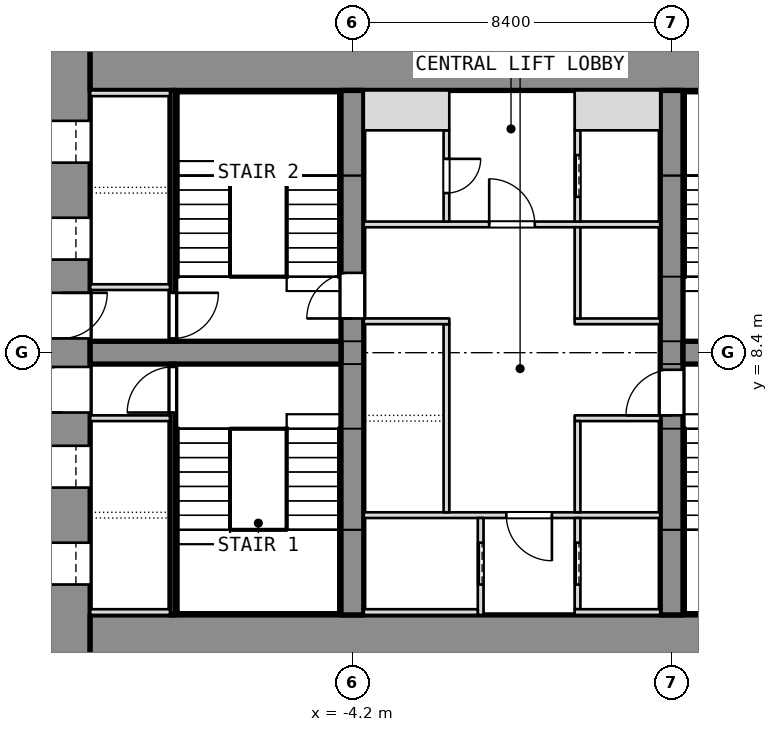
"""IFC4 building model, lengths in metres.
Left out: names, types, materials, properties, quantities, classifications, styles, units other than length and angle.
Written with IfcOpenShell. Run it as: python <this file> out.ifc"""

import sys

from ifc_helpers import new_model, si_unit, direction, frame, frame_2d, origin, place, context, subcontext, project, spatial, rectangle, extrude, element, fill, save


model = new_model("IFC4")
c1 = context("Model", 3, precision=1e-05, world=origin(), true_north=direction((0.0, 1.0)))
c2 = subcontext(c1, "Body", "Model", "MODEL_VIEW")
j1 = project(units=[si_unit("LENGTHUNIT", "METRE"), si_unit("PLANEANGLEUNIT", "RADIAN")], contexts=[c1])
p1 = place(None, origin())
s1 = spatial("IfcSite", under=j1, at=p1, CompositionType="ELEMENT")
p2 = place(p1, origin())
s2 = spatial("IfcBuilding", under=s1, at=p2, CompositionType="ELEMENT")
p3 = place(p2, frame((0.0, 0.0, 21.0)))
s3 = spatial("IfcBuildingStorey", under=s2, at=p3, CompositionType="ELEMENT", Elevation=21.0)
p4 = place(p3, frame((-11.85, 0.0, 0.0), z_axis=(0.0, 0.0, 1.0), x_axis=(0.0, 1.0, 0.0)))
e1 = element("IfcWall", 1, at=p4, inside=s3, PredefinedType="SHEAR", context=c2, shape_type="SweptSolid", body=[
    extrude(rectangle(XDim=16.8, YDim=1.5, at=frame_2d((8.4, 0.0))), origin(), (0.0, 0.0, 1.0), 5.0),
])
p5 = place(p4, frame((2.3, 0.0, 0.0)))
e2 = element("IfcOpeningElement", 2, at=p5, cuts=e1, PredefinedType="OPENING", context=c2, shape_type="SweptSolid", body=[
    extrude(rectangle(XDim=1.1, YDim=2.1, at=frame_2d((0.55, 1.05))), frame((0.0, 0.75, 0.0), z_axis=(0.0, -1.0, 0.0), x_axis=(1.0, 0.0, 0.0)), (0.0, 0.0, 1.0), 1.5),
])
p6 = place(p4, frame((4.85, 0.0, 0.0)))
e3 = element("IfcOpeningElement", 3, at=p6, cuts=e1, PredefinedType="OPENING", context=c2, shape_type="SweptSolid", body=[
    extrude(rectangle(XDim=1.1, YDim=2.1, at=frame_2d((0.55, 1.05))), frame((0.0, 0.75, 0.0), z_axis=(0.0, -1.0, 0.0), x_axis=(1.0, 0.0, 0.0)), (0.0, 0.0, 1.0), 1.5),
])
p7 = place(p4, frame((6.825, 0.0, 0.0)))
e4 = element("IfcOpeningElement", 4, at=p7, cuts=e1, PredefinedType="OPENING", context=c2, shape_type="SweptSolid", body=[
    extrude(rectangle(XDim=1.2, YDim=2.1, at=frame_2d((0.6, 1.05))), frame((0.0, 0.75, 0.0), z_axis=(0.0, -1.0, 0.0), x_axis=(1.0, 0.0, 0.0)), (0.0, 0.0, 1.0), 1.5),
])
p8 = place(p4, frame((13.4, 0.0, 0.0)))
e5 = element("IfcOpeningElement", 5, at=p8, cuts=e1, PredefinedType="OPENING", context=c2, shape_type="SweptSolid", body=[
    extrude(rectangle(XDim=1.1, YDim=2.1, at=frame_2d((0.55, 1.05))), frame((0.0, 0.75, 0.0), z_axis=(0.0, -1.0, 0.0), x_axis=(1.0, 0.0, 0.0)), (0.0, 0.0, 1.0), 1.5),
])
p9 = place(p4, frame((10.85, 0.0, 0.0)))
e6 = element("IfcOpeningElement", 6, at=p9, cuts=e1, PredefinedType="OPENING", context=c2, shape_type="SweptSolid", body=[
    extrude(rectangle(XDim=1.1, YDim=2.1, at=frame_2d((0.55, 1.05))), frame((0.0, 0.75, 0.0), z_axis=(0.0, -1.0, 0.0), x_axis=(1.0, 0.0, 0.0)), (0.0, 0.0, 1.0), 1.5),
])
p10 = place(p4, frame((8.775, 0.0, 0.0)))
e7 = element("IfcOpeningElement", 7, at=p10, cuts=e1, PredefinedType="OPENING", context=c2, shape_type="SweptSolid", body=[
    extrude(rectangle(XDim=1.2, YDim=2.1, at=frame_2d((0.6, 1.05))), frame((0.0, 0.75, 0.0), z_axis=(0.0, -1.0, 0.0), x_axis=(1.0, 0.0, 0.0)), (0.0, 0.0, 1.0), 1.5),
])
for number, where, z_axis, x_axis in (
    (8, (-11.1, 0.75, 0.0), (0.0, 0.0, 1.0), (1.0, 0.0, 0.0)),
    (9, (-11.1, 16.05, 0.0), (0.0, 0.0, 1.0), (1.0, 0.0, 0.0)),
):
    element("IfcWall", number, at=place(p3, frame(where, z_axis=z_axis, x_axis=x_axis)), inside=s3, PredefinedType="SHEAR", context=c2, shape_type="SweptSolid", body=[
        extrude(rectangle(XDim=22.2, YDim=1.5, at=frame_2d((11.1, 0.0))), origin(), (0.0, 0.0, 1.0), 5.0),
    ])
p11 = place(p3, frame((-4.2, 1.5, 0.0), z_axis=(0.0, 0.0, 1.0), x_axis=(0.0, 1.0, 0.0)))
e10 = element("IfcWall", 10, at=p11, inside=s3, PredefinedType="SHEAR", context=c2, shape_type="SweptSolid", body=[
    extrude(rectangle(XDim=13.8, YDim=0.6, at=frame_2d((6.9, 0.0))), origin(), (0.0, 0.0, 1.0), 5.0),
])
p12 = place(p11, frame((7.8, 0.0, 0.0)))
e11 = element("IfcOpeningElement", 11, at=p12, cuts=e10, PredefinedType="OPENING", context=c2, shape_type="SweptSolid", body=[
    extrude(rectangle(XDim=1.2, YDim=2.1, at=frame_2d((0.6, 1.05))), frame((0.0, 0.3, 0.0), z_axis=(0.0, -1.0, 0.0), x_axis=(1.0, 0.0, 0.0)), (0.0, 0.0, 1.0), 0.6),
])
p13 = place(p3, frame((4.2, 1.5, 0.0), z_axis=(0.0, 0.0, 1.0), x_axis=(0.0, 1.0, 0.0)))
e12 = element("IfcWall", 12, at=p13, inside=s3, PredefinedType="SHEAR", context=c2, shape_type="SweptSolid", body=[
    extrude(rectangle(XDim=13.8, YDim=0.6, at=frame_2d((6.9, 0.0))), origin(), (0.0, 0.0, 1.0), 5.0),
])
p14 = place(p13, frame((5.25, 0.0, 0.0)))
e13 = element("IfcOpeningElement", 13, at=p14, cuts=e12, PredefinedType="OPENING", context=c2, shape_type="SweptSolid", body=[
    extrude(rectangle(XDim=1.2, YDim=2.1, at=frame_2d((0.6, 1.05))), frame((0.0, 0.3, 0.0), z_axis=(0.0, -1.0, 0.0), x_axis=(1.0, 0.0, 0.0)), (0.0, 0.0, 1.0), 0.6),
])
for number, where, z_axis, x_axis in (
    (14, (-11.1, 8.4, 0.0), (0.0, 0.0, 1.0), (1.0, 0.0, 0.0)),
    (15, (4.5, 8.4, 0.0), (0.0, 0.0, 1.0), (1.0, 0.0, 0.0)),
):
    element("IfcWall", number, at=place(p3, frame(where, z_axis=z_axis, x_axis=x_axis)), inside=s3, PredefinedType="SHEAR", context=c2, shape_type="SweptSolid", body=[
        extrude(rectangle(XDim=6.6, YDim=0.6, at=frame_2d((3.3, 0.0))), origin(), (0.0, 0.0, 1.0), 5.0),
    ])
p15 = place(p3, frame((-8.925, 1.5, 0.0), z_axis=(0.0, 0.0, 1.0), x_axis=(0.0, 1.0, 0.0)))
e16 = element("IfcWall", 16, at=p15, inside=s3, PredefinedType="SHEAR", context=c2, shape_type="SweptSolid", body=[
    extrude(rectangle(XDim=6.6, YDim=0.15, at=frame_2d((3.3, 0.0))), origin(), (0.0, 0.0, 1.0), 4.78),
])
p16 = place(p15, frame((5.325, 0.0, 0.0)))
e17 = element("IfcOpeningElement", 17, at=p16, cuts=e16, PredefinedType="OPENING", context=c2, shape_type="SweptSolid", body=[
    extrude(rectangle(XDim=1.2, YDim=2.1, at=frame_2d((0.6, 1.05))), frame((0.0, 0.075, 0.0), z_axis=(0.0, -1.0, 0.0), x_axis=(1.0, 0.0, 0.0)), (0.0, 0.0, 1.0), 0.15),
])
for number, where, z_axis, x_axis in (
    (18, (-11.1, 6.675, 0.0), (0.0, 0.0, 1.0), (1.0, 0.0, 0.0)),
    (19, (-11.1, 1.575, 0.0), (0.0, 0.0, 1.0), (1.0, 0.0, 0.0)),
):
    element("IfcWall", number, at=place(p3, frame(where, z_axis=z_axis, x_axis=x_axis)), inside=s3, PredefinedType="SHEAR", context=c2, shape_type="SweptSolid", body=[
        extrude(rectangle(XDim=2.1, YDim=0.15, at=frame_2d((1.05, 0.0))), origin(), (0.0, 0.0, 1.0), 5.0),
    ])
p17 = place(p3, frame((-8.925, 8.7, 0.0), z_axis=(0.0, 0.0, 1.0), x_axis=(0.0, 1.0, 0.0)))
e20 = element("IfcWall", 20, at=p17, inside=s3, PredefinedType="SHEAR", context=c2, shape_type="SweptSolid", body=[
    extrude(rectangle(XDim=6.6, YDim=0.15, at=frame_2d((3.3, 0.0))), origin(), (0.0, 0.0, 1.0), 4.78),
])
p18 = place(p17, frame((0.075, 0.0, 0.0)))
e21 = element("IfcOpeningElement", 21, at=p18, cuts=e20, PredefinedType="OPENING", context=c2, shape_type="SweptSolid", body=[
    extrude(rectangle(XDim=1.2, YDim=2.1, at=frame_2d((0.6, 1.05))), frame((0.0, 0.075, 0.0), z_axis=(0.0, -1.0, 0.0), x_axis=(1.0, 0.0, 0.0)), (0.0, 0.0, 1.0), 0.15),
])
for number, where, z_axis, x_axis in (
    (22, (-11.1, 10.125, 0.0), (0.0, 0.0, 1.0), (1.0, 0.0, 0.0)),
    (23, (-11.1, 15.225, 0.0), (0.0, 0.0, 1.0), (1.0, 0.0, 0.0)),
):
    element("IfcWall", number, at=place(p3, frame(where, z_axis=z_axis, x_axis=x_axis)), inside=s3, PredefinedType="SHEAR", context=c2, shape_type="SweptSolid", body=[
        extrude(rectangle(XDim=2.1, YDim=0.15, at=frame_2d((1.05, 0.0))), origin(), (0.0, 0.0, 1.0), 5.0),
    ])
p19 = place(p3, frame((-3.9, 4.125, 0.0), z_axis=(0.0, 0.0, 1.0), x_axis=(1.0, 0.0, 0.0)))
e24 = element("IfcWall", 24, at=p19, inside=s3, PredefinedType="PARTITIONING", context=c2, shape_type="SweptSolid", body=[
    extrude(rectangle(XDim=7.8, YDim=0.15, at=frame_2d((3.9, 0.0))), origin(), (0.0, 0.0, 1.0), 4.78),
])
p20 = place(p19, frame((3.75, 0.0, 0.0)))
e25 = element("IfcOpeningElement", 25, at=p20, cuts=e24, PredefinedType="OPENING", context=c2, shape_type="SweptSolid", body=[
    extrude(rectangle(XDim=1.2, YDim=2.1, at=frame_2d((0.6, 1.05))), frame((0.0, 0.075, 0.0), z_axis=(0.0, -1.0, 0.0), x_axis=(1.0, 0.0, 0.0)), (0.0, 0.0, 1.0), 0.15),
])
p21 = place(p3, frame((-3.9, 11.775, 0.0), z_axis=(0.0, 0.0, 1.0), x_axis=(1.0, 0.0, 0.0)))
e26 = element("IfcWall", 26, at=p21, inside=s3, PredefinedType="PARTITIONING", context=c2, shape_type="SweptSolid", body=[
    extrude(rectangle(XDim=7.8, YDim=0.15, at=frame_2d((3.9, 0.0))), origin(), (0.0, 0.0, 1.0), 4.78),
])
p22 = place(p21, frame((3.3, 0.0, 0.0)))
e27 = element("IfcOpeningElement", 27, at=p22, cuts=e26, PredefinedType="OPENING", context=c2, shape_type="SweptSolid", body=[
    extrude(rectangle(XDim=1.2, YDim=2.1, at=frame_2d((0.6, 1.05))), frame((0.0, 0.075, 0.0), z_axis=(0.0, -1.0, 0.0), x_axis=(1.0, 0.0, 0.0)), (0.0, 0.0, 1.0), 0.15),
])
p23 = place(p3, frame((-0.825, 1.5, 0.0), z_axis=(0.0, 0.0, 1.0), x_axis=(0.0, 1.0, 0.0)))
e28 = element("IfcWall", 28, at=p23, inside=s3, PredefinedType="SHEAR", context=c2, shape_type="SweptSolid", body=[
    extrude(rectangle(XDim=2.55, YDim=0.15, at=frame_2d((1.275, 0.0))), origin(), (0.0, 0.0, 1.0), 5.0),
])
p24 = place(p23, frame((0.8, 0.0, 0.0)))
e29 = element("IfcOpeningElement", 29, at=p24, cuts=e28, PredefinedType="OPENING", context=c2, shape_type="SweptSolid", body=[
    extrude(rectangle(XDim=1.1, YDim=2.1, at=frame_2d((0.55, 1.05))), frame((0.0, 0.075, 0.0), z_axis=(0.0, -1.0, 0.0), x_axis=(1.0, 0.0, 0.0)), (0.0, 0.0, 1.0), 0.15),
])
p25 = place(p3, frame((-3.9, 1.575, 0.0), z_axis=(0.0, 0.0, 1.0), x_axis=(1.0, 0.0, 0.0)))
e30 = element("IfcWall", 30, at=p25, inside=s3, PredefinedType="SHEAR", context=c2, shape_type="SweptSolid", body=[
    extrude(rectangle(XDim=3.0, YDim=0.15, at=frame_2d((1.5, 0.0))), origin(), (0.0, 0.0, 1.0), 5.0),
])
p26 = place(p3, frame((-1.725, 4.2, 0.0), z_axis=(0.0, 0.0, 1.0), x_axis=(0.0, 1.0, 0.0)))
e31 = element("IfcWall", 31, at=p26, inside=s3, PredefinedType="SHEAR", context=c2, shape_type="SweptSolid", body=[
    extrude(rectangle(XDim=4.95, YDim=0.15, at=frame_2d((2.475, 0.0))), origin(), (0.0, 0.0, 1.0), 5.0),
])
p27 = place(p3, frame((-3.9, 9.225, 0.0), z_axis=(0.0, 0.0, 1.0), x_axis=(1.0, 0.0, 0.0)))
e32 = element("IfcWall", 32, at=p27, inside=s3, PredefinedType="SHEAR", context=c2, shape_type="SweptSolid", body=[
    extrude(rectangle(XDim=2.25, YDim=0.15, at=frame_2d((1.125, 0.0))), origin(), (0.0, 0.0, 1.0), 5.0),
])
p28 = place(p3, frame((-1.725, 11.85, 0.0), z_axis=(0.0, 0.0, 1.0), x_axis=(0.0, 1.0, 0.0)))
e33 = element("IfcWall", 33, at=p28, inside=s3, PredefinedType="PARTITIONING", context=c2, shape_type="SweptSolid", body=[
    extrude(rectangle(XDim=2.4, YDim=0.15, at=frame_2d((1.2, 0.0))), origin(), (0.0, 0.0, 1.0), 4.78),
])
p29 = place(p28, frame((0.75, 0.0, 0.0)))
e34 = element("IfcOpeningElement", 34, at=p29, cuts=e33, PredefinedType="OPENING", context=c2, shape_type="SweptSolid", body=[
    extrude(rectangle(XDim=0.9, YDim=2.1, at=frame_2d((0.45, 1.05))), frame((0.0, 0.075, 0.0), z_axis=(0.0, -1.0, 0.0), x_axis=(1.0, 0.0, 0.0)), (0.0, 0.0, 1.0), 0.15),
])
p30 = place(p3, frame((-3.9, 14.775, 0.0), z_axis=(0.0, 0.0, 1.0), x_axis=(1.0, 0.0, 0.0)))
e35 = element("IfcWall", 35, at=p30, inside=s3, PredefinedType="PARTITIONING", context=c2, shape_type="SweptSolid", body=[
    extrude(rectangle(XDim=2.25, YDim=1.05, at=frame_2d((1.125, 0.0))), origin(), (0.0, 0.0, 1.0), 4.78),
])
p31 = place(p3, frame((1.725, 1.65, 0.0), z_axis=(0.0, 0.0, 1.0), x_axis=(0.0, 1.0, 0.0)))
e36 = element("IfcWall", 36, at=p31, inside=s3, PredefinedType="SHEAR", context=c2, shape_type="SweptSolid", body=[
    extrude(rectangle(XDim=2.4, YDim=0.15, at=frame_2d((1.2, 0.0))), origin(), (0.0, 0.0, 1.0), 5.0),
])
p32 = place(p31, frame((0.65, 0.0, 0.0)))
e37 = element("IfcOpeningElement", 37, at=p32, cuts=e36, PredefinedType="OPENING", context=c2, shape_type="SweptSolid", body=[
    extrude(rectangle(XDim=1.1, YDim=2.1, at=frame_2d((0.55, 1.05))), frame((0.0, 0.075, 0.0), z_axis=(0.0, -1.0, 0.0), x_axis=(1.0, 0.0, 0.0)), (0.0, 0.0, 1.0), 0.15),
])
p33 = place(p3, frame((1.65, 1.575, 0.0), z_axis=(0.0, 0.0, 1.0), x_axis=(1.0, 0.0, 0.0)))
e38 = element("IfcWall", 38, at=p33, inside=s3, PredefinedType="SHEAR", context=c2, shape_type="SweptSolid", body=[
    extrude(rectangle(XDim=2.25, YDim=0.15, at=frame_2d((1.125, 0.0))), origin(), (0.0, 0.0, 1.0), 5.0),
])
p34 = place(p3, frame((1.725, 11.85, 0.0), z_axis=(0.0, 0.0, 1.0), x_axis=(0.0, 1.0, 0.0)))
e39 = element("IfcWall", 39, at=p34, inside=s3, PredefinedType="SHEAR", context=c2, shape_type="SweptSolid", body=[
    extrude(rectangle(XDim=2.4, YDim=0.15, at=frame_2d((1.2, 0.0))), origin(), (0.0, 0.0, 1.0), 5.0),
])
p35 = place(p34, frame((0.65, 0.0, 0.0)))
e40 = element("IfcOpeningElement", 40, at=p35, cuts=e39, PredefinedType="OPENING", context=c2, shape_type="SweptSolid", body=[
    extrude(rectangle(XDim=1.1, YDim=2.1, at=frame_2d((0.55, 1.05))), frame((0.0, 0.075, 0.0), z_axis=(0.0, -1.0, 0.0), x_axis=(1.0, 0.0, 0.0)), (0.0, 0.0, 1.0), 0.15),
])
p36 = place(p3, frame((1.65, 14.775, 0.0), z_axis=(0.0, 0.0, 1.0), x_axis=(1.0, 0.0, 0.0)))
e41 = element("IfcWall", 41, at=p36, inside=s3, PredefinedType="SHEAR", context=c2, shape_type="SweptSolid", body=[
    extrude(rectangle(XDim=2.25, YDim=1.05, at=frame_2d((1.125, 0.0))), origin(), (0.0, 0.0, 1.0), 5.0),
])
for number, where, z_axis, x_axis in (
    (42, (1.65, 6.675, 0.0), (0.0, 0.0, 1.0), (1.0, 0.0, 0.0)),
    (43, (1.65, 9.225, 0.0), (0.0, 0.0, 1.0), (1.0, 0.0, 0.0)),
):
    element("IfcWall", number, at=place(p3, frame(where, z_axis=z_axis, x_axis=x_axis)), inside=s3, PredefinedType="SHEAR", context=c2, shape_type="SweptSolid", body=[
        extrude(rectangle(XDim=2.25, YDim=0.15, at=frame_2d((1.125, 0.0))), origin(), (0.0, 0.0, 1.0), 5.0),
    ])
p37 = place(p3, frame((1.725, 4.2, 0.0), z_axis=(0.0, 0.0, 1.0), x_axis=(0.0, 1.0, 0.0)))
e44 = element("IfcWall", 44, at=p37, inside=s3, PredefinedType="SHEAR", context=c2, shape_type="SweptSolid", body=[
    extrude(rectangle(XDim=2.4, YDim=0.15, at=frame_2d((1.2, 0.0))), origin(), (0.0, 0.0, 1.0), 5.0),
])
p38 = place(p3, frame((1.725, 9.3, 0.0), z_axis=(0.0, 0.0, 1.0), x_axis=(0.0, 1.0, 0.0)))
e45 = element("IfcWall", 45, at=p38, inside=s3, PredefinedType="SHEAR", context=c2, shape_type="SweptSolid", body=[
    extrude(rectangle(XDim=2.4, YDim=0.15, at=frame_2d((1.2, 0.0))), origin(), (0.0, 0.0, 1.0), 5.0),
])
p39 = place(p5, origin())
e46 = element("IfcDoor", 46, at=p39, inside=s3, OperationType="SLIDING_TO_LEFT", PredefinedType="DOOR", context=c2, shape_type="SweptSolid", body=[
    extrude(rectangle(XDim=1.1, YDim=2.1, at=frame_2d((0.55, 1.05))), frame((0.0, 0.025, 0.0), z_axis=(0.0, -1.0, 0.0), x_axis=(1.0, 0.0, 0.0)), (0.0, 0.0, 1.0), 0.05),
])
fill(e2, e46)
p40 = place(p6, origin())
e47 = element("IfcDoor", 47, at=p40, inside=s3, OperationType="SLIDING_TO_LEFT", PredefinedType="DOOR", context=c2, shape_type="SweptSolid", body=[
    extrude(rectangle(XDim=1.1, YDim=2.1, at=frame_2d((0.55, 1.05))), frame((0.0, 0.025, 0.0), z_axis=(0.0, -1.0, 0.0), x_axis=(1.0, 0.0, 0.0)), (0.0, 0.0, 1.0), 0.05),
])
fill(e3, e47)
p41 = place(p7, origin())
e48 = element("IfcDoor", 48, at=p41, inside=s3, OperationType="SINGLE_SWING_LEFT", PredefinedType="DOOR", context=c2, shape_type="SweptSolid", body=[
    extrude(rectangle(XDim=1.2, YDim=2.1, at=frame_2d((0.6, 1.05))), frame((0.0, 0.025, 0.0), z_axis=(0.0, -1.0, 0.0), x_axis=(1.0, 0.0, 0.0)), (0.0, 0.0, 1.0), 0.05),
])
fill(e4, e48)
p42 = place(p16, origin())
e49 = element("IfcDoor", 49, at=p42, inside=s3, OperationType="SINGLE_SWING_LEFT", PredefinedType="DOOR", context=c2, shape_type="SweptSolid", body=[
    extrude(rectangle(XDim=1.2, YDim=2.1, at=frame_2d((0.6, 1.05))), frame((0.0, 0.025, 0.0), z_axis=(0.0, -1.0, 0.0), x_axis=(1.0, 0.0, 0.0)), (0.0, 0.0, 1.0), 0.05),
])
fill(e17, e49)
p43 = place(p8, origin())
e50 = element("IfcDoor", 50, at=p43, inside=s3, OperationType="SLIDING_TO_LEFT", PredefinedType="DOOR", context=c2, shape_type="SweptSolid", body=[
    extrude(rectangle(XDim=1.1, YDim=2.1, at=frame_2d((0.55, 1.05))), frame((0.0, 0.025, 0.0), z_axis=(0.0, -1.0, 0.0), x_axis=(1.0, 0.0, 0.0)), (0.0, 0.0, 1.0), 0.05),
])
fill(e5, e50)
p44 = place(p9, origin())
e51 = element("IfcDoor", 51, at=p44, inside=s3, OperationType="SLIDING_TO_LEFT", PredefinedType="DOOR", context=c2, shape_type="SweptSolid", body=[
    extrude(rectangle(XDim=1.1, YDim=2.1, at=frame_2d((0.55, 1.05))), frame((0.0, 0.025, 0.0), z_axis=(0.0, -1.0, 0.0), x_axis=(1.0, 0.0, 0.0)), (0.0, 0.0, 1.0), 0.05),
])
fill(e6, e51)
p45 = place(p10, origin())
e52 = element("IfcDoor", 52, at=p45, inside=s3, OperationType="SINGLE_SWING_LEFT", PredefinedType="DOOR", context=c2, shape_type="SweptSolid", body=[
    extrude(rectangle(XDim=1.2, YDim=2.1, at=frame_2d((0.6, 1.05))), frame((0.0, 0.025, 0.0), z_axis=(0.0, -1.0, 0.0), x_axis=(1.0, 0.0, 0.0)), (0.0, 0.0, 1.0), 0.05),
])
fill(e7, e52)
p46 = place(p18, origin())
e53 = element("IfcDoor", 53, at=p46, inside=s3, OperationType="SINGLE_SWING_LEFT", PredefinedType="DOOR", context=c2, shape_type="SweptSolid", body=[
    extrude(rectangle(XDim=1.2, YDim=2.1, at=frame_2d((0.6, 1.05))), frame((0.0, 0.025, 0.0), z_axis=(0.0, -1.0, 0.0), x_axis=(1.0, 0.0, 0.0)), (0.0, 0.0, 1.0), 0.05),
])
fill(e21, e53)
p47 = place(p24, origin())
e54 = element("IfcDoor", 54, at=p47, inside=s3, OperationType="SLIDING_TO_LEFT", PredefinedType="DOOR", context=c2, shape_type="SweptSolid", body=[
    extrude(rectangle(XDim=1.1, YDim=2.1, at=frame_2d((0.55, 1.05))), frame((0.0, 0.025, 0.0), z_axis=(0.0, -1.0, 0.0), x_axis=(1.0, 0.0, 0.0)), (0.0, 0.0, 1.0), 0.05),
])
fill(e29, e54)
p48 = place(p32, origin())
e55 = element("IfcDoor", 55, at=p48, inside=s3, OperationType="SLIDING_TO_LEFT", PredefinedType="DOOR", context=c2, shape_type="SweptSolid", body=[
    extrude(rectangle(XDim=1.1, YDim=2.1, at=frame_2d((0.55, 1.05))), frame((0.0, 0.025, 0.0), z_axis=(0.0, -1.0, 0.0), x_axis=(1.0, 0.0, 0.0)), (0.0, 0.0, 1.0), 0.05),
])
fill(e37, e55)
p49 = place(p35, origin())
e56 = element("IfcDoor", 56, at=p49, inside=s3, OperationType="SLIDING_TO_LEFT", PredefinedType="DOOR", context=c2, shape_type="SweptSolid", body=[
    extrude(rectangle(XDim=1.1, YDim=2.1, at=frame_2d((0.55, 1.05))), frame((0.0, 0.025, 0.0), z_axis=(0.0, -1.0, 0.0), x_axis=(1.0, 0.0, 0.0)), (0.0, 0.0, 1.0), 0.05),
])
fill(e40, e56)
p50 = place(p20, origin())
e57 = element("IfcDoor", 57, at=p50, inside=s3, OperationType="SINGLE_SWING_LEFT", PredefinedType="DOOR", context=c2, shape_type="SweptSolid", body=[
    extrude(rectangle(XDim=1.2, YDim=2.1, at=frame_2d((0.6, 1.05))), frame((0.0, 0.025, 0.0), z_axis=(0.0, -1.0, 0.0), x_axis=(1.0, 0.0, 0.0)), (0.0, 0.0, 1.0), 0.05),
])
fill(e25, e57)
p51 = place(p22, origin())
e58 = element("IfcDoor", 58, at=p51, inside=s3, OperationType="SINGLE_SWING_LEFT", PredefinedType="DOOR", context=c2, shape_type="SweptSolid", body=[
    extrude(rectangle(XDim=1.2, YDim=2.1, at=frame_2d((0.6, 1.05))), frame((0.0, 0.025, 0.0), z_axis=(0.0, -1.0, 0.0), x_axis=(1.0, 0.0, 0.0)), (0.0, 0.0, 1.0), 0.05),
])
fill(e27, e58)
p52 = place(p29, origin())
e59 = element("IfcDoor", 59, at=p52, inside=s3, OperationType="SINGLE_SWING_LEFT", PredefinedType="DOOR", context=c2, shape_type="SweptSolid", body=[
    extrude(rectangle(XDim=0.9, YDim=2.1, at=frame_2d((0.45, 1.05))), frame((0.0, 0.025, 0.0), z_axis=(0.0, -1.0, 0.0), x_axis=(1.0, 0.0, 0.0)), (0.0, 0.0, 1.0), 0.05),
])
fill(e34, e59)
p53 = place(p12, origin())
e60 = element("IfcDoor", 60, at=p53, inside=s3, OperationType="SINGLE_SWING_LEFT", PredefinedType="DOOR", context=c2, shape_type="SweptSolid", body=[
    extrude(rectangle(XDim=1.2, YDim=2.1, at=frame_2d((0.6, 1.05))), frame((0.0, 0.025, 0.0), z_axis=(0.0, -1.0, 0.0), x_axis=(1.0, 0.0, 0.0)), (0.0, 0.0, 1.0), 0.05),
])
fill(e11, e60)
p54 = place(p14, origin())
e61 = element("IfcDoor", 61, at=p54, inside=s3, OperationType="SINGLE_SWING_LEFT", PredefinedType="DOOR", context=c2, shape_type="SweptSolid", body=[
    extrude(rectangle(XDim=1.2, YDim=2.1, at=frame_2d((0.6, 1.05))), frame((0.0, 0.025, 0.0), z_axis=(0.0, -1.0, 0.0), x_axis=(1.0, 0.0, 0.0)), (0.0, 0.0, 1.0), 0.05),
])
fill(e13, e61)
save(model, sys.argv[1])
